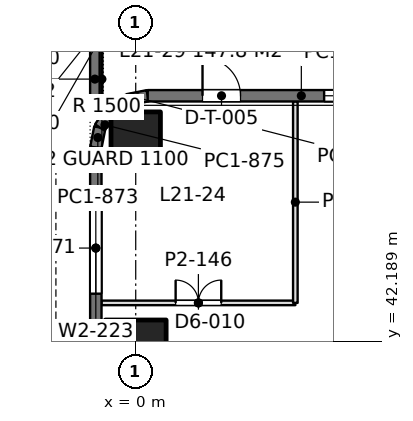
"""IFC4 building model, lengths in metres.
Left out: names, types, materials, properties, quantities, classifications, styles, units other than length and angle.
Written with IfcOpenShell. Run it as: python <this file> out.ifc"""

import sys

from ifc_helpers import new_model, si_unit, direction, frame, frame_2d, origin, origin_2d, place, context, subcontext, project, spatial, rectangle, extrude, element, fill, save


model = new_model("IFC4")
c1 = context("Model", 3, precision=1e-05, world=origin(), true_north=direction((0.0, 1.0)))
c2 = subcontext(c1, "Body", "Model", "MODEL_VIEW")
j1 = project(units=[si_unit("LENGTHUNIT", "METRE"), si_unit("PLANEANGLEUNIT", "RADIAN")], contexts=[c1])
p1 = place(None, origin())
s1 = spatial("IfcSite", under=j1, at=p1, CompositionType="ELEMENT")
p2 = place(p1, origin())
s2 = spatial("IfcBuilding", under=s1, at=p2, CompositionType="ELEMENT")
p3 = place(p2, frame((0.0, 0.0, 96.3)))
s3 = spatial("IfcBuildingStorey", under=s2, at=p3, CompositionType="ELEMENT", Elevation=96.3)
p4 = place(p3, frame((0.0, 42.0, 0.0), z_axis=(0.0, 0.0, 1.0), x_axis=(0.0, 1.0, 0.0)))
e1 = element("IfcColumn", 1, at=p4, inside=s3, PredefinedType="COLUMN", context=c2, shape_type="SweptSolid", body=[
    extrude(rectangle(XDim=1.5, YDim=1.6, at=origin_2d()), origin(), (0.0, 0.0, 1.0), 4.5),
])
p5 = place(p3, frame((0.0, 47.6, -0.36), z_axis=(0.0, 0.0, 1.0), x_axis=(1.0, 0.0, 0.0)))
e2 = element("IfcColumn", 2, at=p5, inside=s3, PredefinedType="COLUMN", context=c2, shape_type="SweptSolid", body=[
    extrude(rectangle(XDim=1.3, YDim=1.25, at=origin_2d()), origin(), (0.0, 0.0, 1.0), 4.86),
])
p6 = place(p3, frame((-1.05, 42.0, 0.0), z_axis=(0.0, 0.0, 1.0), x_axis=(0.0, 1.0, 0.0)))
e3 = element("IfcWall", 3, at=p6, inside=s3, PredefinedType="SOLIDWALL", context=c2, shape_type="SweptSolid", body=[
    extrude(rectangle(XDim=5.285, YDim=0.3, at=frame_2d((2.643, 0.0))), origin(), (0.0, 0.0, 1.0), 4.35),
])
p7 = place(p6, frame((1.443, 0.0, 0.9)))
e4 = element("IfcOpeningElement", 4, at=p7, cuts=e3, PredefinedType="OPENING", context=c2, shape_type="SweptSolid", body=[
    extrude(rectangle(XDim=2.4, YDim=1.9, at=frame_2d((1.2, 0.95))), frame((0.0, 0.16, 0.0), z_axis=(0.0, -1.0, 0.0), x_axis=(1.0, 0.0, 0.0)), (0.0, 0.0, 1.0), 0.32),
])
p8 = place(p3, frame((-1.05, 47.285, 0.0), z_axis=(0.0, 0.0, 1.0), x_axis=(0.195073962632, 0.980788534345, 0.0)))
e5 = element("IfcWall", 5, at=p8, inside=s3, PredefinedType="SOLIDWALL", context=c2, shape_type="SweptSolid", body=[
    extrude(rectangle(XDim=0.541, YDim=0.3, at=frame_2d((0.271, 0.0))), origin(), (0.0, 0.0, 1.0), 4.35),
])
p9 = place(p3, frame((-0.945, 47.815, 0.0), z_axis=(0.0, 0.0, 1.0), x_axis=(0.55534295404, 0.831621430339, 0.0)))
e6 = element("IfcWall", 6, at=p9, inside=s3, PredefinedType="SOLIDWALL", context=c2, shape_type="SweptSolid", body=[
    extrude(rectangle(XDim=0.526, YDim=0.3, at=frame_2d((0.263, 0.0))), origin(), (0.0, 0.0, 1.0), 4.35),
])
p10 = place(p3, frame((-0.653, 48.253, 0.0), z_axis=(0.0, 0.0, 1.0), x_axis=(0.831692711774, 0.555236195849, 0.0)))
e7 = element("IfcWall", 7, at=p10, inside=s3, PredefinedType="SOLIDWALL", context=c2, shape_type="SweptSolid", body=[
    extrude(rectangle(XDim=0.525, YDim=0.3, at=frame_2d((0.263, 0.0))), origin(), (0.0, 0.0, 1.0), 4.35),
])
p11 = place(p3, frame((-0.216, 48.544, 0.0), z_axis=(0.0, 0.0, 1.0), x_axis=(0.980788534345, 0.195073962632, 0.0)))
e8 = element("IfcWall", 8, at=p11, inside=s3, PredefinedType="SOLIDWALL", context=c2, shape_type="SweptSolid", body=[
    extrude(rectangle(XDim=0.541, YDim=0.3, at=frame_2d((0.271, 0.0))), origin(), (0.0, 0.0, 1.0), 4.35),
])
p12 = place(p3, frame((0.315, 48.65, 0.0), z_axis=(0.0, 0.0, 1.0), x_axis=(1.0, 0.0, 0.0)))
e9 = element("IfcWall", 9, at=p12, inside=s3, PredefinedType="SOLIDWALL", context=c2, shape_type="SweptSolid", body=[
    extrude(rectangle(XDim=8.085, YDim=0.3, at=frame_2d((4.042, 0.0))), origin(), (0.0, 0.0, 1.0), 4.35),
])
p13 = place(p12, frame((4.643, 0.0, 0.9)))
e10 = element("IfcOpeningElement", 10, at=p13, cuts=e9, PredefinedType="OPENING", context=c2, shape_type="SweptSolid", body=[
    extrude(rectangle(XDim=3.0, YDim=1.9, at=frame_2d((1.5, 0.95))), frame((0.0, 0.16, 0.0), z_axis=(0.0, -1.0, 0.0), x_axis=(1.0, 0.0, 0.0)), (0.0, 0.0, 1.0), 0.32),
])
p14 = place(p12, frame((1.443, 0.0, 0.0)))
e11 = element("IfcOpeningElement", 11, at=p14, cuts=e9, PredefinedType="OPENING", context=c2, shape_type="SweptSolid", body=[
    extrude(rectangle(XDim=1.0, YDim=2.4, at=frame_2d((0.5, 1.2))), frame((0.0, 0.16, 0.0), z_axis=(0.0, -1.0, 0.0), x_axis=(1.0, 0.0, 0.0)), (0.0, 0.0, 1.0), 0.32),
])
p15 = place(p3, frame((-1.075, 48.077, -0.16), z_axis=(0.0, 0.0, 1.0), x_axis=(0.0, 1.0, 0.0)))
e12 = element("IfcWall", 12, at=p15, inside=s3, PredefinedType="PARAPET", context=c2, shape_type="SweptSolid", body=[
    extrude(rectangle(XDim=2.023, YDim=0.25, at=frame_2d((1.012, 0.0))), origin(), (0.0, 0.0, 1.0), 1.26),
])
p16 = place(p3, frame((-0.902, 43.2, 0.0), z_axis=(0.0, 0.0, 1.0), x_axis=(1.0, 0.0, 0.0)))
e13 = element("IfcWall", 13, at=p16, inside=s3, PredefinedType="PARTITIONING", context=c2, shape_type="SweptSolid", body=[
    extrude(rectangle(XDim=5.102, YDim=0.12, at=frame_2d((2.551, 0.0))), origin(), (0.0, 0.0, 1.0), 3.86),
])
p17 = place(p16, frame((1.952, 0.0, 0.0)))
e14 = element("IfcOpeningElement", 14, at=p17, cuts=e13, PredefinedType="OPENING", context=c2, shape_type="SweptSolid", body=[
    extrude(rectangle(XDim=1.2, YDim=2.2, at=frame_2d((0.6, 1.1))), frame((0.0, 0.07, 0.0), z_axis=(0.0, -1.0, 0.0), x_axis=(1.0, 0.0, 0.0)), (0.0, 0.0, 1.0), 0.14),
])
p18 = place(p3, frame((4.2, 43.2, 0.0), z_axis=(0.0, 0.0, 1.0), x_axis=(0.0, 1.0, 0.0)))
e15 = element("IfcWall", 15, at=p18, inside=s3, PredefinedType="PARTITIONING", context=c2, shape_type="SweptSolid", body=[
    extrude(rectangle(XDim=5.302, YDim=0.12, at=frame_2d((2.651, 0.0))), origin(), (0.0, 0.0, 1.0), 3.86),
])
p19 = place(p7, origin())
e16 = element("IfcWindow", 16, at=p19, inside=s3, PartitioningType="SINGLE_PANEL", PredefinedType="WINDOW", context=c2, shape_type="SweptSolid", body=[
    extrude(rectangle(XDim=2.4, YDim=1.9, at=frame_2d((1.2, 0.95))), frame((0.0, 0.03, 0.0), z_axis=(0.0, -1.0, 0.0), x_axis=(1.0, 0.0, 0.0)), (0.0, 0.0, 1.0), 0.06),
])
fill(e4, e16)
p20 = place(p13, origin())
e17 = element("IfcWindow", 17, at=p20, inside=s3, PartitioningType="SINGLE_PANEL", PredefinedType="WINDOW", context=c2, shape_type="SweptSolid", body=[
    extrude(rectangle(XDim=3.0, YDim=1.9, at=frame_2d((1.5, 0.95))), frame((0.0, 0.03, 0.0), z_axis=(0.0, -1.0, 0.0), x_axis=(1.0, 0.0, 0.0)), (0.0, 0.0, 1.0), 0.06),
])
fill(e10, e17)
p21 = place(p14, origin())
e18 = element("IfcDoor", 18, at=p21, inside=s3, OperationType="SINGLE_SWING_LEFT", PredefinedType="DOOR", context=c2, shape_type="SweptSolid", body=[
    extrude(rectangle(XDim=1.0, YDim=2.4, at=frame_2d((0.5, 1.2))), frame((0.0, 0.025, 0.0), z_axis=(0.0, -1.0, 0.0), x_axis=(1.0, 0.0, 0.0)), (0.0, 0.0, 1.0), 0.05),
])
fill(e11, e18)
p22 = place(p17, origin())
e19 = element("IfcDoor", 19, at=p22, inside=s3, OperationType="DOUBLE_DOOR_SINGLE_SWING_OPPOSITE_LEFT", PredefinedType="DOOR", context=c2, shape_type="SweptSolid", body=[
    extrude(rectangle(XDim=1.2, YDim=2.2, at=frame_2d((0.6, 1.1))), frame((0.0, 0.025, 0.0), z_axis=(0.0, -1.0, 0.0), x_axis=(1.0, 0.0, 0.0)), (0.0, 0.0, 1.0), 0.05),
])
fill(e14, e19)
save(model, sys.argv[1])
